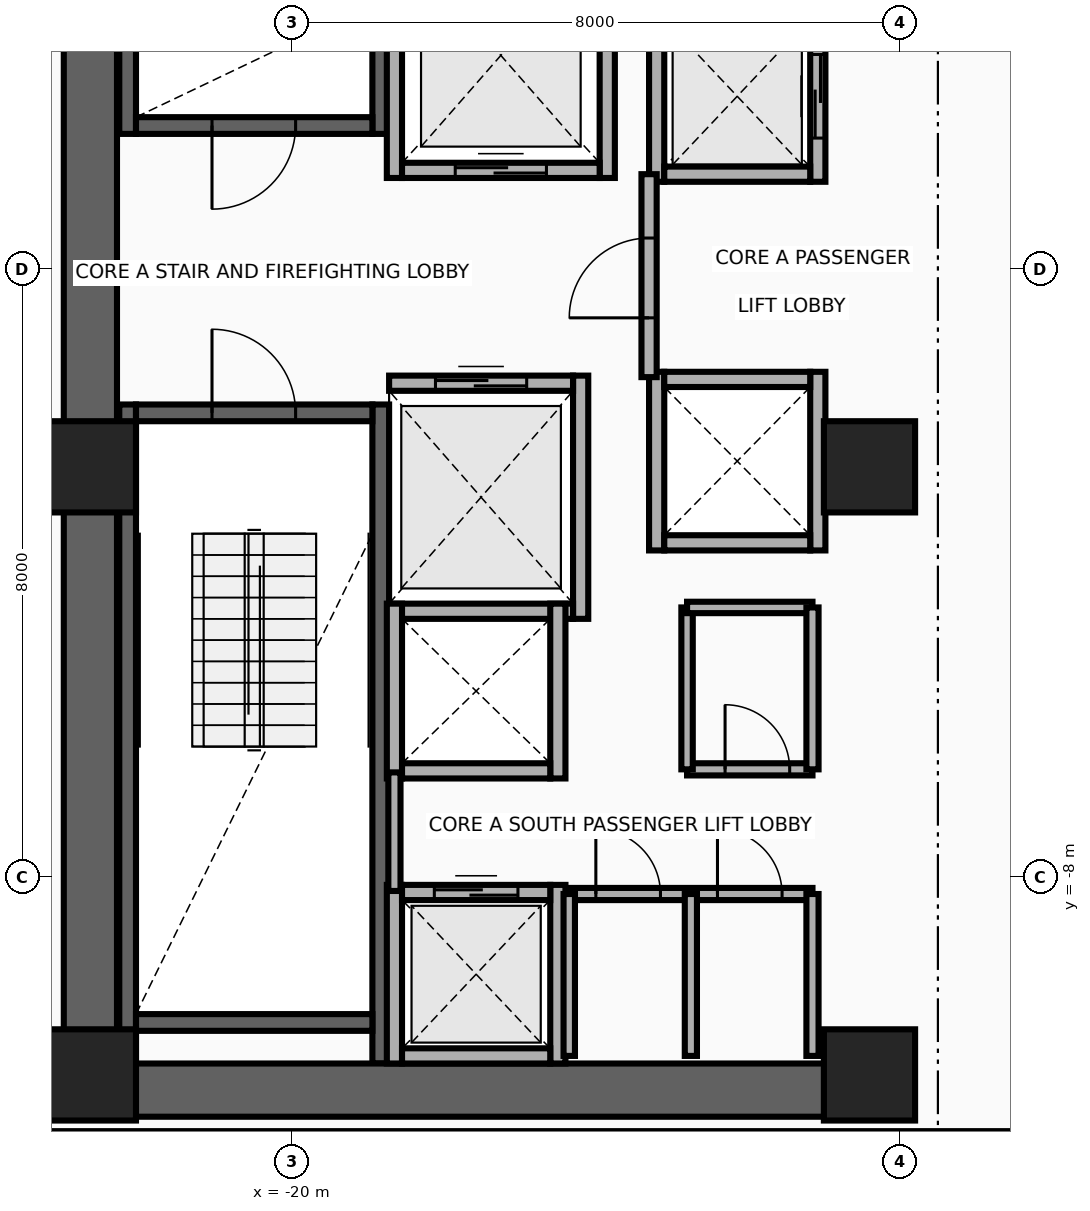
"""IFC4 building model, lengths in metres.
Left out: names, types, materials, properties, quantities, classifications, styles, units other than length and angle.
Written with IfcOpenShell. Run it as: python <this file> out.ifc"""

import sys

from ifc_helpers import new_model, si_unit, direction, frame, frame_2d, origin, origin_2d, place, context, subcontext, project, spatial, rectangle, extrude, source, transform, mapped, element, fill, save


model = new_model("IFC4")
c1 = context("Model", 3, precision=1e-05, world=origin(), true_north=direction((0.0, 1.0)))
c2 = subcontext(c1, "Body", "Model", "MODEL_VIEW")
j1 = project(units=[si_unit("LENGTHUNIT", "METRE"), si_unit("PLANEANGLEUNIT", "RADIAN")], contexts=[c1])
p1 = place(None, origin())
s1 = spatial("IfcSite", under=j1, at=p1, CompositionType="ELEMENT")
p2 = place(p1, origin())
s2 = spatial("IfcBuilding", under=s1, at=p2, CompositionType="ELEMENT")
p3 = place(p2, frame((0.0, 0.0, 139.0)))
s3 = spatial("IfcBuildingStorey", under=s2, at=p3, CompositionType="ELEMENT", Elevation=139.0)
for number, where, z_axis, x_axis in (
    (1, (-22.16, 1.78, 0.0), (0.0, 0.0, 1.0), (0.0, 1.0, 0.0)),
    (2, (-18.83, 1.78, 0.0), (0.0, 0.0, 1.0), (0.0, 1.0, 0.0)),
):
    element("IfcWall", number, at=place(p3, frame(where, z_axis=z_axis, x_axis=x_axis)), inside=s3, PredefinedType="SHEAR", context=c2, shape_type="SweptSolid", body=[
        extrude(rectangle(XDim=8.67, YDim=0.22, at=frame_2d((4.335, 0.0))), origin(), (0.0, 0.0, 1.0), 3.46),
    ])
p4 = place(p3, frame((-22.05, 1.89, 0.0), z_axis=(0.0, 0.0, 1.0), x_axis=(1.0, 0.0, 0.0)))
e3 = element("IfcWall", 3, at=p4, inside=s3, PredefinedType="SHEAR", context=c2, shape_type="SweptSolid", body=[
    extrude(rectangle(XDim=3.11, YDim=0.22, at=frame_2d((1.555, 0.0))), origin(), (0.0, 0.0, 1.0), 3.46),
])
p5 = place(p4, frame((1.0, 0.0, 0.0)))
e4 = element("IfcOpeningElement", 4, at=p5, cuts=e3, PredefinedType="OPENING", context=c2, shape_type="SweptSolid", body=[
    extrude(rectangle(XDim=1.1, YDim=2.15, at=frame_2d((0.55, 1.075))), frame((0.0, 0.125, 0.0), z_axis=(0.0, -1.0, 0.0), x_axis=(1.0, 0.0, 0.0)), (0.0, 0.0, 1.0), 0.25),
])
for number, where, z_axis, x_axis in (
    (5, (-22.16, -10.45, 0.0), (0.0, 0.0, 1.0), (0.0, 1.0, 0.0)),
    (6, (-18.83, -10.45, 0.0), (0.0, 0.0, 1.0), (0.0, 1.0, 0.0)),
):
    element("IfcWall", number, at=place(p3, frame(where, z_axis=z_axis, x_axis=x_axis)), inside=s3, PredefinedType="SHEAR", context=c2, shape_type="SweptSolid", body=[
        extrude(rectangle(XDim=8.67, YDim=0.22, at=frame_2d((4.335, 0.0))), origin(), (0.0, 0.0, 1.0), 3.46),
    ])
p6 = place(p3, frame((-22.05, -9.91, 0.0), z_axis=(0.0, 0.0, 1.0), x_axis=(1.0, 0.0, 0.0)))
e7 = element("IfcWall", 7, at=p6, inside=s3, PredefinedType="SHEAR", context=c2, shape_type="SweptSolid", body=[
    extrude(rectangle(XDim=3.11, YDim=0.22, at=frame_2d((1.555, 0.0))), origin(), (0.0, 0.0, 1.0), 3.46),
])
p7 = place(p3, frame((-22.05, -1.89, 0.0), z_axis=(0.0, 0.0, 1.0), x_axis=(1.0, 0.0, 0.0)))
e8 = element("IfcWall", 8, at=p7, inside=s3, PredefinedType="SHEAR", context=c2, shape_type="SweptSolid", body=[
    extrude(rectangle(XDim=3.11, YDim=0.22, at=frame_2d((1.555, 0.0))), origin(), (0.0, 0.0, 1.0), 3.46),
])
p8 = place(p7, frame((1.0, 0.0, 0.0)))
e9 = element("IfcOpeningElement", 9, at=p8, cuts=e8, PredefinedType="OPENING", context=c2, shape_type="SweptSolid", body=[
    extrude(rectangle(XDim=1.1, YDim=2.15, at=frame_2d((0.55, 1.075))), frame((0.0, 0.125, 0.0), z_axis=(0.0, -1.0, 0.0), x_axis=(1.0, 0.0, 0.0)), (0.0, 0.0, 1.0), 0.25),
])
p9 = place(p3, frame((-22.65, -11.15, 0.0), z_axis=(0.0, 0.0, 1.0), x_axis=(0.0, 1.0, 0.0)))
e10 = element("IfcWall", 10, at=p9, inside=s3, PredefinedType="SHEAR", context=c2, shape_type="SweptSolid", body=[
    extrude(rectangle(XDim=22.3, YDim=0.7, at=frame_2d((11.15, 0.0))), origin(), (0.0, 0.0, 1.0), 3.46),
])
p10 = place(p3, frame((-22.65, -10.8, 0.0), z_axis=(0.0, 0.0, 1.0), x_axis=(1.0, 0.0, 0.0)))
e11 = element("IfcWall", 11, at=p10, inside=s3, PredefinedType="SHEAR", context=c2, shape_type="SweptSolid", body=[
    extrude(rectangle(XDim=10.25, YDim=0.7, at=frame_2d((5.125, 0.0))), origin(), (0.0, 0.0, 1.0), 3.46),
])
m1 = source(origin(), c2, "Body", "SweptSolid", [
    extrude(rectangle(XDim=1.2, YDim=1.2, at=origin_2d()), origin(), (0.0, 0.0, 1.0), 3.7),
])
for number, where, z_axis, x_axis in (
    (12, (-22.65, -10.6, 0.0), (0.0, 0.0, 1.0), (1.0, 0.0, 0.0)),
    (13, (-12.4, -10.6, 0.0), (0.0, 0.0, 1.0), (1.0, 0.0, 0.0)),
    (14, (-22.65, -2.6, 0.0), (0.0, 0.0, 1.0), (1.0, 0.0, 0.0)),
    (15, (-12.4, -2.6, 0.0), (0.0, 0.0, 1.0), (1.0, 0.0, 0.0)),
):
    element("IfcColumn", number, at=place(p3, frame(where, z_axis=z_axis, x_axis=x_axis)), inside=s3, PredefinedType="COLUMN", context=c2, shape_type="MappedRepresentation", body=[
        mapped(m1, transform((0.0, 0.0, 0.0), x_axis=(1.0, 0.0, 0.0), y_axis=(0.0, 1.0, 0.0), z_axis=(0.0, 0.0, 1.0), scale=1.0)),
    ])
for number, where, z_axis, x_axis in (
    (16, (-18.65, 1.2, 0.0), (0.0, 0.0, 1.0), (0.0, 1.0, 0.0)),
    (17, (-15.85, 1.2, 0.0), (0.0, 0.0, 1.0), (0.0, 1.0, 0.0)),
):
    element("IfcWall", number, at=place(p3, frame(where, z_axis=z_axis, x_axis=x_axis)), inside=s3, PredefinedType="MOVABLE", context=c2, shape_type="SweptSolid", body=[
        extrude(rectangle(XDim=3.225, YDim=0.2, at=frame_2d((1.613, 0.0))), origin(), (0.0, 0.0, 1.0), 3.46),
    ])
p11 = place(p3, frame((-18.55, 1.3, 0.0), z_axis=(0.0, 0.0, 1.0), x_axis=(1.0, 0.0, 0.0)))
e18 = element("IfcWall", 18, at=p11, inside=s3, PredefinedType="MOVABLE", context=c2, shape_type="SweptSolid", body=[
    extrude(rectangle(XDim=2.6, YDim=0.2, at=frame_2d((1.3, 0.0))), origin(), (0.0, 0.0, 1.0), 3.46),
])
p12 = place(p11, frame((0.7, 0.0, 0.0)))
e19 = element("IfcOpeningElement", 19, at=p12, cuts=e18, PredefinedType="OPENING", context=c2, shape_type="SweptSolid", body=[
    extrude(rectangle(XDim=1.2, YDim=2.1, at=frame_2d((0.6, 1.05))), frame((0.0, 0.115, 0.0), z_axis=(0.0, -1.0, 0.0), x_axis=(1.0, 0.0, 0.0)), (0.0, 0.0, 1.0), 0.23),
])
p13 = place(p3, frame((-16.2, -4.6, 0.0), z_axis=(0.0, 0.0, 1.0), x_axis=(0.0, 1.0, 0.0)))
e20 = element("IfcWall", 20, at=p13, inside=s3, PredefinedType="MOVABLE", context=c2, shape_type="SweptSolid", body=[
    extrude(rectangle(XDim=3.2, YDim=0.2, at=frame_2d((1.6, 0.0))), origin(), (0.0, 0.0, 1.0), 3.46),
])
p14 = place(p3, frame((-18.72, -4.5, 0.0), z_axis=(0.0, 0.0, 1.0), x_axis=(1.0, 0.0, 0.0)))
e21 = element("IfcWall", 21, at=p14, inside=s3, PredefinedType="MOVABLE", context=c2, shape_type="SweptSolid", body=[
    extrude(rectangle(XDim=2.42, YDim=0.2, at=frame_2d((1.21, 0.0))), origin(), (0.0, 0.0, 1.0), 3.46),
])
p15 = place(p3, frame((-18.72, -1.5, 0.0), z_axis=(0.0, 0.0, 1.0), x_axis=(1.0, 0.0, 0.0)))
e22 = element("IfcWall", 22, at=p15, inside=s3, PredefinedType="MOVABLE", context=c2, shape_type="SweptSolid", body=[
    extrude(rectangle(XDim=2.42, YDim=0.2, at=frame_2d((1.21, 0.0))), origin(), (0.0, 0.0, 1.0), 3.46),
])
p16 = place(p15, frame((0.61, 0.0, 0.0)))
e23 = element("IfcOpeningElement", 23, at=p16, cuts=e22, PredefinedType="OPENING", context=c2, shape_type="SweptSolid", body=[
    extrude(rectangle(XDim=1.2, YDim=2.1, at=frame_2d((0.6, 1.05))), frame((0.0, 0.115, 0.0), z_axis=(0.0, -1.0, 0.0), x_axis=(1.0, 0.0, 0.0)), (0.0, 0.0, 1.0), 0.23),
])
for number, where, z_axis, x_axis in (
    (24, (-18.65, -10.45, 0.0), (0.0, 0.0, 1.0), (0.0, 1.0, 0.0)),
    (25, (-16.5, -10.45, 0.0), (0.0, 0.0, 1.0), (0.0, 1.0, 0.0)),
):
    element("IfcWall", number, at=place(p3, frame(where, z_axis=z_axis, x_axis=x_axis)), inside=s3, PredefinedType="MOVABLE", context=c2, shape_type="SweptSolid", body=[
        extrude(rectangle(XDim=2.35, YDim=0.2, at=frame_2d((1.175, 0.0))), origin(), (0.0, 0.0, 1.0), 2.666),
    ])
p17 = place(p3, frame((-18.55, -10.35, 0.0), z_axis=(0.0, 0.0, 1.0), x_axis=(1.0, 0.0, 0.0)))
e26 = element("IfcWall", 26, at=p17, inside=s3, PredefinedType="MOVABLE", context=c2, shape_type="SweptSolid", body=[
    extrude(rectangle(XDim=1.95, YDim=0.2, at=frame_2d((0.975, 0.0))), origin(), (0.0, 0.0, 1.0), 2.666),
])
p18 = place(p3, frame((-18.55, -8.2, 0.0), z_axis=(0.0, 0.0, 1.0), x_axis=(1.0, 0.0, 0.0)))
e27 = element("IfcWall", 27, at=p18, inside=s3, PredefinedType="MOVABLE", context=c2, shape_type="SweptSolid", body=[
    extrude(rectangle(XDim=1.95, YDim=0.2, at=frame_2d((0.975, 0.0))), origin(), (0.0, 0.0, 1.0), 3.46),
])
p19 = place(p18, frame((0.425, 0.0, 0.0)))
e28 = element("IfcOpeningElement", 28, at=p19, cuts=e27, PredefinedType="OPENING", context=c2, shape_type="SweptSolid", body=[
    extrude(rectangle(XDim=1.1, YDim=2.1, at=frame_2d((0.55, 1.05))), frame((0.0, 0.115, 0.0), z_axis=(0.0, -1.0, 0.0), x_axis=(1.0, 0.0, 0.0)), (0.0, 0.0, 1.0), 0.23),
])
p20 = place(p3, frame((-15.2, 1.15, 0.0), z_axis=(0.0, 0.0, 1.0), x_axis=(0.0, 1.0, 0.0)))
e29 = element("IfcWall", 29, at=p20, inside=s3, PredefinedType="MOVABLE", context=c2, shape_type="SweptSolid", body=[
    extrude(rectangle(XDim=2.25, YDim=0.2, at=frame_2d((1.125, 0.0))), origin(), (0.0, 0.0, 1.0), 3.46),
])
p21 = place(p3, frame((-13.08, 1.15, 0.0), z_axis=(0.0, 0.0, 1.0), x_axis=(0.0, 1.0, 0.0)))
e30 = element("IfcWall", 30, at=p21, inside=s3, PredefinedType="MOVABLE", context=c2, shape_type="SweptSolid", body=[
    extrude(rectangle(XDim=2.25, YDim=0.2, at=frame_2d((1.125, 0.0))), origin(), (0.0, 0.0, 1.0), 3.46),
])
p22 = place(p21, frame((0.575, 0.0, 0.0)))
e31 = element("IfcOpeningElement", 31, at=p22, cuts=e30, PredefinedType="OPENING", context=c2, shape_type="SweptSolid", body=[
    extrude(rectangle(XDim=1.1, YDim=2.1, at=frame_2d((0.55, 1.05))), frame((0.0, 0.115, 0.0), z_axis=(0.0, -1.0, 0.0), x_axis=(1.0, 0.0, 0.0)), (0.0, 0.0, 1.0), 0.23),
])
p23 = place(p3, frame((-15.1, 1.25, 0.0), z_axis=(0.0, 0.0, 1.0), x_axis=(1.0, 0.0, 0.0)))
e32 = element("IfcWall", 32, at=p23, inside=s3, PredefinedType="MOVABLE", context=c2, shape_type="SweptSolid", body=[
    extrude(rectangle(XDim=1.92, YDim=0.2, at=frame_2d((0.96, 0.0))), origin(), (0.0, 0.0, 1.0), 3.46),
])
for number, where, z_axis, x_axis in (
    (33, (-18.65, -6.7, 0.0), (0.0, 0.0, 1.0), (0.0, 1.0, 0.0)),
    (34, (-16.5, -6.7, 0.0), (0.0, 0.0, 1.0), (0.0, 1.0, 0.0)),
):
    element("IfcWall", number, at=place(p3, frame(where, z_axis=z_axis, x_axis=x_axis)), inside=s3, PredefinedType="MOVABLE", context=c2, shape_type="SweptSolid", body=[
        extrude(rectangle(XDim=2.3, YDim=0.2, at=frame_2d((1.15, 0.0))), origin(), (0.0, 0.0, 1.0), 3.46),
    ])
p24 = place(p3, frame((-18.55, -6.6, 0.0), z_axis=(0.0, 0.0, 1.0), x_axis=(1.0, 0.0, 0.0)))
e35 = element("IfcWall", 35, at=p24, inside=s3, PredefinedType="MOVABLE", context=c2, shape_type="SweptSolid", body=[
    extrude(rectangle(XDim=1.95, YDim=0.2, at=frame_2d((0.975, 0.0))), origin(), (0.0, 0.0, 1.0), 3.46),
])
for number, where, z_axis, x_axis in (
    (36, (-15.2, -3.7, 0.0), (0.0, 0.0, 1.0), (0.0, 1.0, 0.0)),
    (37, (-13.08, -3.7, 0.0), (0.0, 0.0, 1.0), (0.0, 1.0, 0.0)),
):
    element("IfcWall", number, at=place(p3, frame(where, z_axis=z_axis, x_axis=x_axis)), inside=s3, PredefinedType="MOVABLE", context=c2, shape_type="SweptSolid", body=[
        extrude(rectangle(XDim=2.35, YDim=0.2, at=frame_2d((1.175, 0.0))), origin(), (0.0, 0.0, 1.0), 3.46),
    ])
for number, where, z_axis, x_axis in (
    (38, (-15.1, -3.6, 0.0), (0.0, 0.0, 1.0), (1.0, 0.0, 0.0)),
    (39, (-15.1, -1.45, 0.0), (0.0, 0.0, 1.0), (1.0, 0.0, 0.0)),
):
    element("IfcWall", number, at=place(p3, frame(where, z_axis=z_axis, x_axis=x_axis)), inside=s3, PredefinedType="MOVABLE", context=c2, shape_type="SweptSolid", body=[
        extrude(rectangle(XDim=1.92, YDim=0.2, at=frame_2d((0.96, 0.0))), origin(), (0.0, 0.0, 1.0), 3.46),
    ])
p25 = place(p3, frame((-15.3, -1.42, 0.0), z_axis=(0.0, 0.0, 1.0), x_axis=(0.0, 1.0, 0.0)))
e40 = element("IfcWall", 40, at=p25, inside=s3, PredefinedType="PARTITIONING", context=c2, shape_type="SweptSolid", body=[
    extrude(rectangle(XDim=2.67, YDim=0.2, at=frame_2d((1.335, 0.0))), origin(), (0.0, 0.0, 1.0), 3.46),
])
p26 = place(p25, frame((0.78, 0.0, 0.0)))
e41 = element("IfcOpeningElement", 41, at=p26, cuts=e40, PredefinedType="OPENING", context=c2, shape_type="SweptSolid", body=[
    extrude(rectangle(XDim=1.05, YDim=2.15, at=frame_2d((0.525, 1.075))), frame((0.0, 0.115, 0.0), z_axis=(0.0, -1.0, 0.0), x_axis=(1.0, 0.0, 0.0)), (0.0, 0.0, 1.0), 0.23),
])
p27 = place(p3, frame((-18.65, -8.18, 0.0), z_axis=(0.0, 0.0, 1.0), x_axis=(0.0, 1.0, 0.0)))
e42 = element("IfcWall", 42, at=p27, inside=s3, PredefinedType="PARTITIONING", context=c2, shape_type="SweptSolid", body=[
    extrude(rectangle(XDim=1.56, YDim=0.16, at=frame_2d((0.78, 0.0))), origin(), (0.0, 0.0, 1.0), 3.46),
])
p28 = place(p3, frame((-16.35, -8.22, 0.0), z_axis=(0.0, 0.0, 1.0), x_axis=(1.0, 0.0, 0.0)))
e43 = element("IfcWall", 43, at=p28, inside=s3, PredefinedType="PARTITIONING", context=c2, shape_type="SweptSolid", body=[
    extrude(rectangle(XDim=3.2, YDim=0.16, at=frame_2d((1.6, 0.0))), origin(), (0.0, 0.0, 1.0), 3.46),
])
p29 = place(p28, frame((0.35, 0.0, 0.0)))
e44 = element("IfcOpeningElement", 44, at=p29, cuts=e43, PredefinedType="OPENING", context=c2, shape_type="SweptSolid", body=[
    extrude(rectangle(XDim=0.85, YDim=2.05, at=frame_2d((0.425, 1.025))), frame((0.0, 0.095, 0.0), z_axis=(0.0, -1.0, 0.0), x_axis=(1.0, 0.0, 0.0)), (0.0, 0.0, 1.0), 0.19),
])
p30 = place(p28, frame((1.95, 0.0, 0.0)))
e45 = element("IfcOpeningElement", 45, at=p30, cuts=e43, PredefinedType="OPENING", context=c2, shape_type="SweptSolid", body=[
    extrude(rectangle(XDim=0.85, YDim=2.05, at=frame_2d((0.425, 1.025))), frame((0.0, 0.095, 0.0), z_axis=(0.0, -1.0, 0.0), x_axis=(1.0, 0.0, 0.0)), (0.0, 0.0, 1.0), 0.19),
])
p31 = place(p3, frame((-16.35, -10.35, 0.0), z_axis=(0.0, 0.0, 1.0), x_axis=(0.0, 1.0, 0.0)))
e46 = element("IfcWall", 46, at=p31, inside=s3, PredefinedType="PARTITIONING", context=c2, shape_type="SweptSolid", body=[
    extrude(rectangle(XDim=2.13, YDim=0.15, at=frame_2d((1.065, 0.0))), origin(), (0.0, 0.0, 1.0), 3.46),
])
for number, where, z_axis, x_axis in (
    (47, (-13.15, -10.35, 0.0), (0.0, 0.0, 1.0), (0.0, 1.0, 0.0)),
    (48, (-14.75, -10.35, 0.0), (0.0, 0.0, 1.0), (0.0, 1.0, 0.0)),
):
    element("IfcWall", number, at=place(p3, frame(where, z_axis=z_axis, x_axis=x_axis)), inside=s3, PredefinedType="PARTITIONING", context=c2, shape_type="SweptSolid", body=[
        extrude(rectangle(XDim=2.13, YDim=0.16, at=frame_2d((1.065, 0.0))), origin(), (0.0, 0.0, 1.0), 3.46),
    ])
p32 = place(p3, frame((-14.8, -6.58, 0.0), z_axis=(0.0, 0.0, 1.0), x_axis=(1.0, 0.0, 0.0)))
e49 = element("IfcWall", 49, at=p32, inside=s3, PredefinedType="PARTITIONING", context=c2, shape_type="SweptSolid", body=[
    extrude(rectangle(XDim=1.65, YDim=0.16, at=frame_2d((0.825, 0.0))), origin(), (0.0, 0.0, 1.0), 3.46),
])
p33 = place(p32, frame((0.5, 0.0, 0.0)))
e50 = element("IfcOpeningElement", 50, at=p33, cuts=e49, PredefinedType="OPENING", context=c2, shape_type="SweptSolid", body=[
    extrude(rectangle(XDim=0.85, YDim=2.05, at=frame_2d((0.425, 1.025))), frame((0.0, 0.095, 0.0), z_axis=(0.0, -1.0, 0.0), x_axis=(1.0, 0.0, 0.0)), (0.0, 0.0, 1.0), 0.19),
])
p34 = place(p3, frame((-14.8, -6.58, 0.0), z_axis=(0.0, 0.0, 1.0), x_axis=(0.0, 1.0, 0.0)))
e51 = element("IfcWall", 51, at=p34, inside=s3, PredefinedType="PARTITIONING", context=c2, shape_type="SweptSolid", body=[
    extrude(rectangle(XDim=2.13, YDim=0.15, at=frame_2d((1.065, 0.0))), origin(), (0.0, 0.0, 1.0), 3.46),
])
p35 = place(p3, frame((-14.8, -4.45, 0.0), z_axis=(0.0, 0.0, 1.0), x_axis=(1.0, 0.0, 0.0)))
e52 = element("IfcWall", 52, at=p35, inside=s3, PredefinedType="PARTITIONING", context=c2, shape_type="SweptSolid", body=[
    extrude(rectangle(XDim=1.65, YDim=0.15, at=frame_2d((0.825, 0.0))), origin(), (0.0, 0.0, 1.0), 3.46),
])
p36 = place(p3, frame((-13.15, -6.58, 0.0), z_axis=(0.0, 0.0, 1.0), x_axis=(0.0, 1.0, 0.0)))
e53 = element("IfcWall", 53, at=p36, inside=s3, PredefinedType="PARTITIONING", context=c2, shape_type="SweptSolid", body=[
    extrude(rectangle(XDim=2.13, YDim=0.16, at=frame_2d((1.065, 0.0))), origin(), (0.0, 0.0, 1.0), 3.46),
])
p37 = place(p3, frame((-23.45, -11.42, 0.0), z_axis=(0.0, 0.0, 1.0), x_axis=(1.0, 0.0, 0.0)))
e54 = element("IfcWall", 54, at=p37, inside=s3, PredefinedType="PARTITIONING", context=c2, shape_type="SweptSolid", body=[
    extrude(rectangle(XDim=13.84, YDim=0.16, at=frame_2d((6.92, 0.0))), origin(), (0.0, 0.0, 1.0), 2.834),
])
p38 = place(p12, origin())
e55 = element("IfcDoor", 55, at=p38, inside=s3, OperationType="DOUBLE_DOOR_SLIDING", PredefinedType="DOOR", context=c2, shape_type="SweptSolid", body=[
    extrude(rectangle(XDim=1.2, YDim=2.1, at=frame_2d((0.6, 1.05))), frame((0.0, 0.025, 0.0), z_axis=(0.0, -1.0, 0.0), x_axis=(1.0, 0.0, 0.0)), (0.0, 0.0, 1.0), 0.05),
])
fill(e19, e55)
p39 = place(p16, origin())
e56 = element("IfcDoor", 56, at=p39, inside=s3, OperationType="DOUBLE_DOOR_SLIDING", PredefinedType="DOOR", context=c2, shape_type="SweptSolid", body=[
    extrude(rectangle(XDim=1.2, YDim=2.1, at=frame_2d((0.6, 1.05))), frame((0.0, 0.025, 0.0), z_axis=(0.0, -1.0, 0.0), x_axis=(1.0, 0.0, 0.0)), (0.0, 0.0, 1.0), 0.05),
])
fill(e23, e56)
p40 = place(p19, origin())
e57 = element("IfcDoor", 57, at=p40, inside=s3, OperationType="DOUBLE_DOOR_SLIDING", PredefinedType="DOOR", context=c2, shape_type="SweptSolid", body=[
    extrude(rectangle(XDim=1.1, YDim=2.1, at=frame_2d((0.55, 1.05))), frame((0.0, 0.025, 0.0), z_axis=(0.0, -1.0, 0.0), x_axis=(1.0, 0.0, 0.0)), (0.0, 0.0, 1.0), 0.05),
])
fill(e28, e57)
p41 = place(p22, origin())
e58 = element("IfcDoor", 58, at=p41, inside=s3, OperationType="DOUBLE_DOOR_SLIDING", PredefinedType="DOOR", context=c2, shape_type="SweptSolid", body=[
    extrude(rectangle(XDim=1.1, YDim=2.1, at=frame_2d((0.55, 1.05))), frame((0.0, 0.025, 0.0), z_axis=(0.0, -1.0, 0.0), x_axis=(1.0, 0.0, 0.0)), (0.0, 0.0, 1.0), 0.05),
])
fill(e31, e58)
p42 = place(p26, origin())
e59 = element("IfcDoor", 59, at=p42, inside=s3, OperationType="SINGLE_SWING_RIGHT", PredefinedType="DOOR", context=c2, shape_type="SweptSolid", body=[
    extrude(rectangle(XDim=1.05, YDim=2.15, at=frame_2d((0.525, 1.075))), frame((0.0, 0.025, 0.0), z_axis=(0.0, -1.0, 0.0), x_axis=(1.0, 0.0, 0.0)), (0.0, 0.0, 1.0), 0.05),
])
fill(e41, e59)
p43 = place(p5, frame((1.1, 0.0, 0.0), z_axis=(0.0, 0.0, 1.0), x_axis=(-1.0, 0.0, 0.0)))
e60 = element("IfcDoor", 60, at=p43, inside=s3, OperationType="SINGLE_SWING_LEFT", PredefinedType="DOOR", context=c2, shape_type="SweptSolid", body=[
    extrude(rectangle(XDim=1.1, YDim=2.15, at=frame_2d((0.55, 1.075))), frame((0.0, 0.025, 0.0), z_axis=(0.0, -1.0, 0.0), x_axis=(1.0, 0.0, 0.0)), (0.0, 0.0, 1.0), 0.05),
])
fill(e4, e60)
p44 = place(p8, origin())
e61 = element("IfcDoor", 61, at=p44, inside=s3, OperationType="SINGLE_SWING_RIGHT", PredefinedType="DOOR", context=c2, shape_type="SweptSolid", body=[
    extrude(rectangle(XDim=1.1, YDim=2.15, at=frame_2d((0.55, 1.075))), frame((0.0, 0.025, 0.0), z_axis=(0.0, -1.0, 0.0), x_axis=(1.0, 0.0, 0.0)), (0.0, 0.0, 1.0), 0.05),
])
fill(e9, e61)
p45 = place(p29, origin())
e62 = element("IfcDoor", 62, at=p45, inside=s3, OperationType="SINGLE_SWING_LEFT", PredefinedType="DOOR", context=c2, shape_type="SweptSolid", body=[
    extrude(rectangle(XDim=0.85, YDim=2.05, at=frame_2d((0.425, 1.025))), frame((0.0, 0.025, 0.0), z_axis=(0.0, -1.0, 0.0), x_axis=(1.0, 0.0, 0.0)), (0.0, 0.0, 1.0), 0.05),
])
fill(e44, e62)
p46 = place(p30, origin())
e63 = element("IfcDoor", 63, at=p46, inside=s3, OperationType="SINGLE_SWING_RIGHT", PredefinedType="DOOR", context=c2, shape_type="SweptSolid", body=[
    extrude(rectangle(XDim=0.85, YDim=2.05, at=frame_2d((0.425, 1.025))), frame((0.0, 0.025, 0.0), z_axis=(0.0, -1.0, 0.0), x_axis=(1.0, 0.0, 0.0)), (0.0, 0.0, 1.0), 0.05),
])
fill(e45, e63)
p47 = place(p33, origin())
e64 = element("IfcDoor", 64, at=p47, inside=s3, OperationType="SINGLE_SWING_LEFT", PredefinedType="DOOR", context=c2, shape_type="SweptSolid", body=[
    extrude(rectangle(XDim=0.85, YDim=2.05, at=frame_2d((0.425, 1.025))), frame((0.0, 0.025, 0.0), z_axis=(0.0, -1.0, 0.0), x_axis=(1.0, 0.0, 0.0)), (0.0, 0.0, 1.0), 0.05),
])
fill(e50, e64)
save(model, sys.argv[1])
